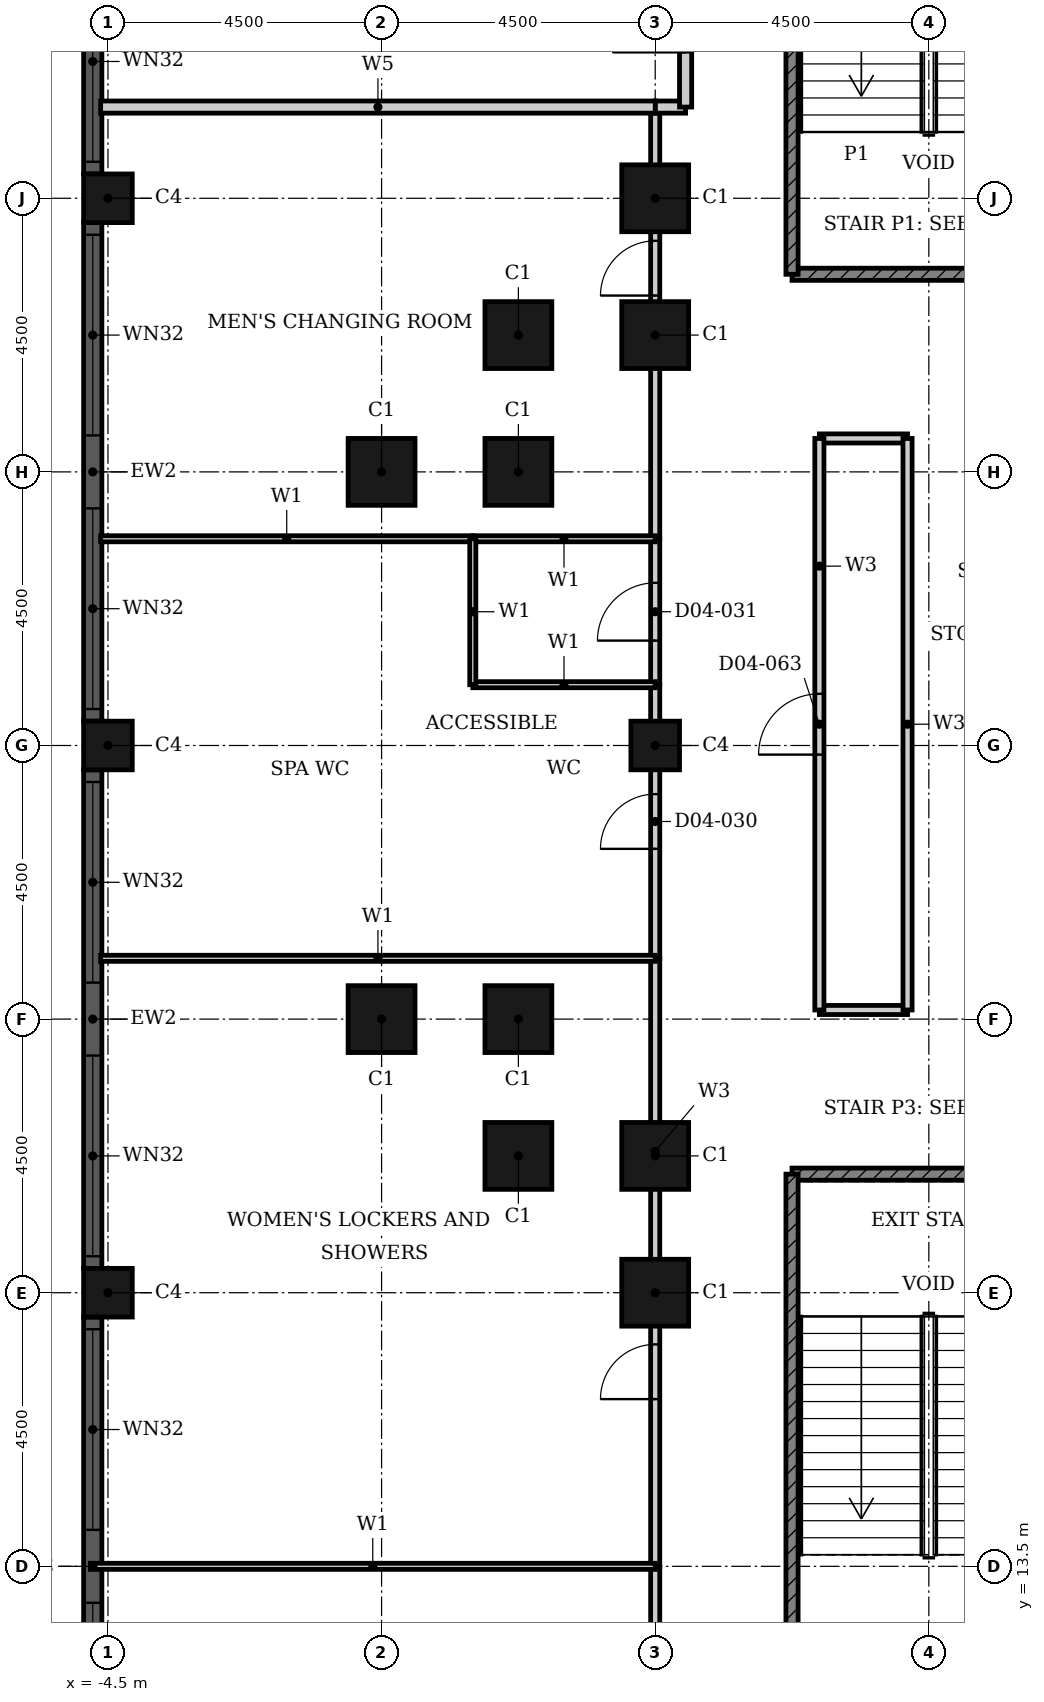
"""IFC4 building model, lengths in metres.
Left out: names, types, materials, properties, quantities, classifications, styles, units other than length and angle.
Written with IfcOpenShell. Run it as: python <this file> out.ifc"""

import sys

from ifc_helpers import new_model, si_unit, direction, frame, frame_2d, origin, origin_2d, place, context, subcontext, project, spatial, rectangle, hollow_rectangle, extrude, element, fill, save


model = new_model("IFC4")
c1 = context("Model", 3, precision=1e-05, world=origin(), true_north=direction((0.0, 1.0)))
c2 = subcontext(c1, "Body", "Model", "MODEL_VIEW")
j1 = project(units=[si_unit("LENGTHUNIT", "METRE"), si_unit("PLANEANGLEUNIT", "RADIAN")], contexts=[c1])
p1 = place(None, origin())
s1 = spatial("IfcSite", under=j1, at=p1, CompositionType="ELEMENT")
p2 = place(p1, origin())
s2 = spatial("IfcBuilding", under=s1, at=p2, CompositionType="ELEMENT")
p3 = place(p2, frame((0.0, 0.0, 24.0)))
s3 = spatial("IfcBuildingStorey", under=s2, at=p3, CompositionType="ELEMENT", Elevation=24.0)
for number, where, z_axis, x_axis in (
    (1, (4.5, 36.0, 0.0), (0.0, 0.0, 1.0), (1.0, 0.0, 0.0)),
    (2, (4.5, 33.75, 0.0), (0.0, 0.0, 1.0), (1.0, 0.0, 0.0)),
    (3, (2.25, 33.75, 0.0), (0.0, 0.0, 1.0), (1.0, 0.0, 0.0)),
    (4, (2.25, 31.5, 0.0), (0.0, 0.0, 1.0), (1.0, 0.0, 0.0)),
    (5, (0.0, 31.5, 0.0), (0.0, 0.0, 1.0), (1.0, 0.0, 0.0)),
    (6, (0.0, 22.5, 0.0), (0.0, 0.0, 1.0), (1.0, 0.0, 0.0)),
    (7, (2.25, 22.5, 0.0), (0.0, 0.0, 1.0), (1.0, 0.0, 0.0)),
    (8, (2.25, 20.25, 0.0), (0.0, 0.0, 1.0), (1.0, 0.0, 0.0)),
    (9, (4.5, 20.25, 0.0), (0.0, 0.0, 1.0), (1.0, 0.0, 0.0)),
    (10, (4.5, 18.0, 0.0), (0.0, 0.0, 1.0), (1.0, 0.0, 0.0)),
):
    element("IfcColumn", number, at=place(p3, frame(where, z_axis=z_axis, x_axis=x_axis)), inside=s3, PredefinedType="COLUMN", context=c2, shape_type="SweptSolid", body=[
        extrude(hollow_rectangle(XDim=1.1, YDim=1.1, WallThickness=0.036, at=origin_2d()), origin(), (0.0, 0.0, 1.0), 4.8),
    ])
for number, where, z_axis, x_axis in (
    (11, (-4.5, 18.0, 0.0), (0.0, 0.0, 1.0), (1.0, 0.0, 0.0)),
    (12, (-4.5, 27.0, 0.0), (0.0, 0.0, 1.0), (1.0, 0.0, 0.0)),
    (13, (-4.5, 36.0, 0.0), (0.0, 0.0, 1.0), (1.0, 0.0, 0.0)),
    (14, (4.5, 27.0, 0.0), (0.0, 0.0, 1.0), (1.0, 0.0, 0.0)),
):
    element("IfcColumn", number, at=place(p3, frame(where, z_axis=z_axis, x_axis=x_axis)), inside=s3, PredefinedType="COLUMN", context=c2, shape_type="SweptSolid", body=[
        extrude(hollow_rectangle(XDim=0.8, YDim=0.8, WallThickness=0.025, at=origin_2d()), origin(), (0.0, 0.0, 1.0), 4.8),
    ])
p4 = place(p3, frame((-4.75, 44.6, 0.0), z_axis=(0.0, 0.0, 1.0), x_axis=(0.0, -1.0, 0.0)))
e15 = element("IfcWall", 15, at=p4, inside=s3, PredefinedType="SOLIDWALL", context=c2, shape_type="SweptSolid", body=[
    extrude(rectangle(XDim=8.2, YDim=0.3, at=frame_2d((4.1, 0.0))), origin(), (0.0, 0.0, 1.0), 4.8),
])
p5 = place(p4, frame((0.2, 0.0, 0.9)))
e16 = element("IfcOpeningElement", 16, at=p5, cuts=e15, PredefinedType="OPENING", context=c2, shape_type="SweptSolid", body=[
    extrude(rectangle(XDim=3.3, YDim=2.9, at=frame_2d((1.65, 1.45))), frame((0.0, 0.16, 0.0), z_axis=(0.0, -1.0, 0.0), x_axis=(1.0, 0.0, 0.0)), (0.0, 0.0, 1.0), 0.32),
])
p6 = place(p4, frame((4.7, 0.0, 0.9)))
e17 = element("IfcOpeningElement", 17, at=p6, cuts=e15, PredefinedType="OPENING", context=c2, shape_type="SweptSolid", body=[
    extrude(rectangle(XDim=3.3, YDim=2.9, at=frame_2d((1.65, 1.45))), frame((0.0, 0.16, 0.0), z_axis=(0.0, -1.0, 0.0), x_axis=(1.0, 0.0, 0.0)), (0.0, 0.0, 1.0), 0.32),
])
p7 = place(p3, frame((-4.75, 35.6, 0.0), z_axis=(0.0, 0.0, 1.0), x_axis=(0.0, -1.0, 0.0)))
e18 = element("IfcWall", 18, at=p7, inside=s3, PredefinedType="SOLIDWALL", context=c2, shape_type="SweptSolid", body=[
    extrude(rectangle(XDim=8.2, YDim=0.3, at=frame_2d((4.1, 0.0))), origin(), (0.0, 0.0, 1.0), 4.8),
])
p8 = place(p7, frame((0.2, 0.0, 0.9)))
e19 = element("IfcOpeningElement", 19, at=p8, cuts=e18, PredefinedType="OPENING", context=c2, shape_type="SweptSolid", body=[
    extrude(rectangle(XDim=3.3, YDim=2.9, at=frame_2d((1.65, 1.45))), frame((0.0, 0.16, 0.0), z_axis=(0.0, -1.0, 0.0), x_axis=(1.0, 0.0, 0.0)), (0.0, 0.0, 1.0), 0.32),
])
p9 = place(p7, frame((4.7, 0.0, 0.9)))
e20 = element("IfcOpeningElement", 20, at=p9, cuts=e18, PredefinedType="OPENING", context=c2, shape_type="SweptSolid", body=[
    extrude(rectangle(XDim=3.3, YDim=2.9, at=frame_2d((1.65, 1.45))), frame((0.0, 0.16, 0.0), z_axis=(0.0, -1.0, 0.0), x_axis=(1.0, 0.0, 0.0)), (0.0, 0.0, 1.0), 0.32),
])
p10 = place(p3, frame((-4.75, 26.6, 0.0), z_axis=(0.0, 0.0, 1.0), x_axis=(0.0, -1.0, 0.0)))
e21 = element("IfcWall", 21, at=p10, inside=s3, PredefinedType="SOLIDWALL", context=c2, shape_type="SweptSolid", body=[
    extrude(rectangle(XDim=8.2, YDim=0.3, at=frame_2d((4.1, 0.0))), origin(), (0.0, 0.0, 1.0), 4.8),
])
p11 = place(p10, frame((0.2, 0.0, 0.9)))
e22 = element("IfcOpeningElement", 22, at=p11, cuts=e21, PredefinedType="OPENING", context=c2, shape_type="SweptSolid", body=[
    extrude(rectangle(XDim=3.3, YDim=2.9, at=frame_2d((1.65, 1.45))), frame((0.0, 0.16, 0.0), z_axis=(0.0, -1.0, 0.0), x_axis=(1.0, 0.0, 0.0)), (0.0, 0.0, 1.0), 0.32),
])
p12 = place(p10, frame((4.7, 0.0, 0.9)))
e23 = element("IfcOpeningElement", 23, at=p12, cuts=e21, PredefinedType="OPENING", context=c2, shape_type="SweptSolid", body=[
    extrude(rectangle(XDim=3.3, YDim=2.9, at=frame_2d((1.65, 1.45))), frame((0.0, 0.16, 0.0), z_axis=(0.0, -1.0, 0.0), x_axis=(1.0, 0.0, 0.0)), (0.0, 0.0, 1.0), 0.32),
])
p13 = place(p3, frame((-4.75, 17.6, 0.0), z_axis=(0.0, 0.0, 1.0), x_axis=(0.0, -1.0, 0.0)))
e24 = element("IfcWall", 24, at=p13, inside=s3, PredefinedType="SOLIDWALL", context=c2, shape_type="SweptSolid", body=[
    extrude(rectangle(XDim=8.2, YDim=0.3, at=frame_2d((4.1, 0.0))), origin(), (0.0, 0.0, 1.0), 4.8),
])
p14 = place(p13, frame((0.2, 0.0, 0.9)))
e25 = element("IfcOpeningElement", 25, at=p14, cuts=e24, PredefinedType="OPENING", context=c2, shape_type="SweptSolid", body=[
    extrude(rectangle(XDim=3.3, YDim=2.9, at=frame_2d((1.65, 1.45))), frame((0.0, 0.16, 0.0), z_axis=(0.0, -1.0, 0.0), x_axis=(1.0, 0.0, 0.0)), (0.0, 0.0, 1.0), 0.32),
])
p15 = place(p13, frame((4.7, 0.0, 0.9)))
e26 = element("IfcOpeningElement", 26, at=p15, cuts=e24, PredefinedType="OPENING", context=c2, shape_type="SweptSolid", body=[
    extrude(rectangle(XDim=3.3, YDim=2.9, at=frame_2d((1.65, 1.45))), frame((0.0, 0.16, 0.0), z_axis=(0.0, -1.0, 0.0), x_axis=(1.0, 0.0, 0.0)), (0.0, 0.0, 1.0), 0.32),
])
for number, where, z_axis, x_axis in (
    (27, (7.2, 22.65, 0.0), (0.0, 0.0, 1.0), (1.0, 0.0, 0.0)),
    (28, (7.2, 32.05, 0.0), (0.0, 0.0, 1.0), (1.0, 0.0, 0.0)),
):
    element("IfcWall", number, at=place(p3, frame(where, z_axis=z_axis, x_axis=x_axis)), inside=s3, PredefinedType="PARTITIONING", context=c2, shape_type="SweptSolid", body=[
        extrude(rectangle(XDim=1.45, YDim=0.15, at=frame_2d((0.725, 0.0))), origin(), (0.0, 0.0, 1.0), 4.45),
    ])
p16 = place(p3, frame((4.5, 9.0, 0.0), z_axis=(0.0, 0.0, 1.0), x_axis=(0.0, 1.0, 0.0)))
e29 = element("IfcWall", 29, at=p16, inside=s3, PredefinedType="PARTITIONING", context=c2, shape_type="SweptSolid", body=[
    extrude(rectangle(XDim=4.5, YDim=0.15, at=frame_2d((2.25, 0.0))), origin(), (0.0, 0.0, 1.0), 4.45),
])
p17 = place(p16, frame((1.8, 0.0, 0.0)))
e30 = element("IfcOpeningElement", 30, at=p17, cuts=e29, PredefinedType="OPENING", context=c2, shape_type="SweptSolid", body=[
    extrude(rectangle(XDim=0.9, YDim=2.1, at=frame_2d((0.45, 1.05))), frame((0.0, 0.085, 0.0), z_axis=(0.0, -1.0, 0.0), x_axis=(1.0, 0.0, 0.0)), (0.0, 0.0, 1.0), 0.17),
])
p18 = place(p3, frame((4.5, 13.5, 0.0), z_axis=(0.0, 0.0, 1.0), x_axis=(0.0, 1.0, 0.0)))
e31 = element("IfcWall", 31, at=p18, inside=s3, PredefinedType="PARTITIONING", context=c2, shape_type="SweptSolid", body=[
    extrude(rectangle(XDim=10.0, YDim=0.15, at=frame_2d((5.0, 0.0))), origin(), (0.0, 0.0, 1.0), 4.45),
])
p19 = place(p18, frame((2.75, 0.0, 0.0)))
e32 = element("IfcOpeningElement", 32, at=p19, cuts=e31, PredefinedType="OPENING", context=c2, shape_type="SweptSolid", body=[
    extrude(rectangle(XDim=0.9, YDim=2.1, at=frame_2d((0.45, 1.05))), frame((0.0, 0.085, 0.0), z_axis=(0.0, -1.0, 0.0), x_axis=(1.0, 0.0, 0.0)), (0.0, 0.0, 1.0), 0.17),
])
p20 = place(p3, frame((4.5, 23.5, 0.0), z_axis=(0.0, 0.0, 1.0), x_axis=(0.0, 1.0, 0.0)))
e33 = element("IfcWall", 33, at=p20, inside=s3, PredefinedType="PARTITIONING", context=c2, shape_type="SweptSolid", body=[
    extrude(rectangle(XDim=4.5, YDim=0.15, at=frame_2d((2.25, 0.0))), origin(), (0.0, 0.0, 1.0), 4.45),
])
p21 = place(p20, frame((1.8, 0.0, 0.0)))
e34 = element("IfcOpeningElement", 34, at=p21, cuts=e33, PredefinedType="OPENING", context=c2, shape_type="SweptSolid", body=[
    extrude(rectangle(XDim=0.9, YDim=2.1, at=frame_2d((0.45, 1.05))), frame((0.0, 0.085, 0.0), z_axis=(0.0, -1.0, 0.0), x_axis=(1.0, 0.0, 0.0)), (0.0, 0.0, 1.0), 0.17),
])
p22 = place(p3, frame((4.5, 28.0, 0.0), z_axis=(0.0, 0.0, 1.0), x_axis=(0.0, 1.0, 0.0)))
e35 = element("IfcWall", 35, at=p22, inside=s3, PredefinedType="PARTITIONING", context=c2, shape_type="SweptSolid", body=[
    extrude(rectangle(XDim=2.4, YDim=0.15, at=frame_2d((1.2, 0.0))), origin(), (0.0, 0.0, 1.0), 4.45),
])
p23 = place(p22, frame((0.725, 0.0, 0.0)))
e36 = element("IfcOpeningElement", 36, at=p23, cuts=e35, PredefinedType="OPENING", context=c2, shape_type="SweptSolid", body=[
    extrude(rectangle(XDim=0.95, YDim=2.1, at=frame_2d((0.475, 1.05))), frame((0.0, 0.085, 0.0), z_axis=(0.0, -1.0, 0.0), x_axis=(1.0, 0.0, 0.0)), (0.0, 0.0, 1.0), 0.17),
])
p24 = place(p3, frame((4.5, 30.4, 0.0), z_axis=(0.0, 0.0, 1.0), x_axis=(0.0, 1.0, 0.0)))
e37 = element("IfcWall", 37, at=p24, inside=s3, PredefinedType="PARTITIONING", context=c2, shape_type="SweptSolid", body=[
    extrude(rectangle(XDim=7.1, YDim=0.15, at=frame_2d((3.55, 0.0))), origin(), (0.0, 0.0, 1.0), 4.45),
])
p25 = place(p24, frame((4.0, 0.0, 0.0)))
e38 = element("IfcOpeningElement", 38, at=p25, cuts=e37, PredefinedType="OPENING", context=c2, shape_type="SweptSolid", body=[
    extrude(rectangle(XDim=0.9, YDim=2.1, at=frame_2d((0.45, 1.05))), frame((0.0, 0.085, 0.0), z_axis=(0.0, -1.0, 0.0), x_axis=(1.0, 0.0, 0.0)), (0.0, 0.0, 1.0), 0.17),
])
p26 = place(p3, frame((7.2, 22.65, 0.0), z_axis=(0.0, 0.0, 1.0), x_axis=(0.0, 1.0, 0.0)))
e39 = element("IfcWall", 39, at=p26, inside=s3, PredefinedType="PARTITIONING", context=c2, shape_type="SweptSolid", body=[
    extrude(rectangle(XDim=9.4, YDim=0.15, at=frame_2d((4.7, 0.0))), origin(), (0.0, 0.0, 1.0), 4.45),
])
p27 = place(p26, frame((4.2, 0.0, 0.0)))
e40 = element("IfcOpeningElement", 40, at=p27, cuts=e39, PredefinedType="OPENING", context=c2, shape_type="SweptSolid", body=[
    extrude(rectangle(XDim=1.0, YDim=2.1, at=frame_2d((0.5, 1.05))), frame((0.0, 0.085, 0.0), z_axis=(0.0, -1.0, 0.0), x_axis=(1.0, 0.0, 0.0)), (0.0, 0.0, 1.0), 0.17),
])
p28 = place(p3, frame((8.65, 22.65, 0.0), z_axis=(0.0, 0.0, 1.0), x_axis=(0.0, 1.0, 0.0)))
e41 = element("IfcWall", 41, at=p28, inside=s3, PredefinedType="PARTITIONING", context=c2, shape_type="SweptSolid", body=[
    extrude(rectangle(XDim=9.4, YDim=0.15, at=frame_2d((4.7, 0.0))), origin(), (0.0, 0.0, 1.0), 4.45),
])
p29 = place(p3, frame((-4.79, 13.5, 0.0), z_axis=(0.0, 0.0, 1.0), x_axis=(1.0, 0.0, 0.0)))
e42 = element("IfcWall", 42, at=p29, inside=s3, PredefinedType="PARTITIONING", context=c2, shape_type="SweptSolid", body=[
    extrude(rectangle(XDim=9.29, YDim=0.1, at=frame_2d((4.645, 0.0))), origin(), (0.0, 0.0, 1.0), 4.45),
])
p30 = place(p3, frame((-4.62, 23.5, 0.0), z_axis=(0.0, 0.0, 1.0), x_axis=(1.0, 0.0, 0.0)))
e43 = element("IfcWall", 43, at=p30, inside=s3, PredefinedType="PARTITIONING", context=c2, shape_type="SweptSolid", body=[
    extrude(rectangle(XDim=9.12, YDim=0.1, at=frame_2d((4.56, 0.0))), origin(), (0.0, 0.0, 1.0), 4.45),
])
p31 = place(p3, frame((1.5, 28.0, 0.0), z_axis=(0.0, 0.0, 1.0), x_axis=(1.0, 0.0, 0.0)))
e44 = element("IfcWall", 44, at=p31, inside=s3, PredefinedType="PARTITIONING", context=c2, shape_type="SweptSolid", body=[
    extrude(rectangle(XDim=3.0, YDim=0.1, at=frame_2d((1.5, 0.0))), origin(), (0.0, 0.0, 1.0), 4.45),
])
p32 = place(p3, frame((-4.62, 30.4, 0.0), z_axis=(0.0, 0.0, 1.0), x_axis=(1.0, 0.0, 0.0)))
e45 = element("IfcWall", 45, at=p32, inside=s3, PredefinedType="PARTITIONING", context=c2, shape_type="SweptSolid", body=[
    extrude(rectangle(XDim=6.12, YDim=0.1, at=frame_2d((3.06, 0.0))), origin(), (0.0, 0.0, 1.0), 4.45),
])
p33 = place(p3, frame((1.5, 30.4, 0.0), z_axis=(0.0, 0.0, 1.0), x_axis=(1.0, 0.0, 0.0)))
e46 = element("IfcWall", 46, at=p33, inside=s3, PredefinedType="PARTITIONING", context=c2, shape_type="SweptSolid", body=[
    extrude(rectangle(XDim=3.0, YDim=0.1, at=frame_2d((1.5, 0.0))), origin(), (0.0, 0.0, 1.0), 4.45),
])
p34 = place(p3, frame((1.5, 28.0, 0.0), z_axis=(0.0, 0.0, 1.0), x_axis=(0.0, 1.0, 0.0)))
e47 = element("IfcWall", 47, at=p34, inside=s3, PredefinedType="PARTITIONING", context=c2, shape_type="SweptSolid", body=[
    extrude(rectangle(XDim=2.4, YDim=0.1, at=frame_2d((1.2, 0.0))), origin(), (0.0, 0.0, 1.0), 4.45),
])
p35 = place(p3, frame((4.5, 37.5, 0.0), z_axis=(0.0, 0.0, 1.0), x_axis=(1.0, 0.0, 0.0)))
e48 = element("IfcWall", 48, at=p35, inside=s3, PredefinedType="PARTITIONING", context=c2, shape_type="SweptSolid", body=[
    extrude(rectangle(XDim=0.5, YDim=0.2, at=frame_2d((0.25, 0.0))), origin(), (0.0, 0.0, 1.0), 4.45),
])
p36 = place(p3, frame((-4.62, 37.5, 0.0), z_axis=(0.0, 0.0, 1.0), x_axis=(1.0, 0.0, 0.0)))
e49 = element("IfcWall", 49, at=p36, inside=s3, PredefinedType="PARTITIONING", context=c2, shape_type="SweptSolid", body=[
    extrude(rectangle(XDim=9.12, YDim=0.2, at=frame_2d((4.56, 0.0))), origin(), (0.0, 0.0, 1.0), 4.45),
])
p37 = place(p3, frame((5.0, 37.5, 0.0), z_axis=(0.0, 0.0, 1.0), x_axis=(0.0, 1.0, 0.0)))
e50 = element("IfcWall", 50, at=p37, inside=s3, PredefinedType="PARTITIONING", context=c2, shape_type="SweptSolid", body=[
    extrude(rectangle(XDim=3.0, YDim=0.2, at=frame_2d((1.5, 0.0))), origin(), (0.0, 0.0, 1.0), 4.45),
])
p38 = place(p37, frame((0.9, 0.0, 0.0)))
e51 = element("IfcOpeningElement", 51, at=p38, cuts=e50, PredefinedType="OPENING", context=c2, shape_type="SweptSolid", body=[
    extrude(rectangle(XDim=1.2, YDim=2.1, at=frame_2d((0.6, 1.05))), frame((0.0, 0.11, 0.0), z_axis=(0.0, -1.0, 0.0), x_axis=(1.0, 0.0, 0.0)), (0.0, 0.0, 1.0), 0.22),
])
for number, where, z_axis, x_axis in (
    (52, (6.75, 19.95, 0.0), (0.0, 0.0, 1.0), (1.0, 0.0, 0.0)),
    (53, (6.75, 34.75, 0.0), (0.0, 0.0, 1.0), (1.0, 0.0, 0.0)),
):
    element("IfcWall", number, at=place(p3, frame(where, z_axis=z_axis, x_axis=x_axis)), inside=s3, PredefinedType="SHEAR", context=c2, shape_type="SweptSolid", body=[
        extrude(rectangle(XDim=4.5, YDim=0.2, at=frame_2d((2.25, 0.0))), origin(), (0.0, 0.0, 1.0), 4.45),
    ])
for number, where, z_axis, x_axis in (
    (54, (6.75, 34.75, 0.0), (0.0, 0.0, 1.0), (0.0, 1.0, 0.0)),
    (55, (6.75, 11.5, 0.0), (0.0, 0.0, 1.0), (0.0, 1.0, 0.0)),
):
    element("IfcWall", number, at=place(p3, frame(where, z_axis=z_axis, x_axis=x_axis)), inside=s3, PredefinedType="SHEAR", context=c2, shape_type="SweptSolid", body=[
        extrude(rectangle(XDim=8.45, YDim=0.2, at=frame_2d((4.225, 0.0))), origin(), (0.0, 0.0, 1.0), 4.45),
    ])
p39 = place(p6, origin())
e56 = element("IfcWindow", 56, at=p39, inside=s3, PartitioningType="SINGLE_PANEL", PredefinedType="WINDOW", context=c2, shape_type="SweptSolid", body=[
    extrude(rectangle(XDim=3.3, YDim=2.9, at=frame_2d((1.65, 1.45))), frame((0.0, 0.03, 0.0), z_axis=(0.0, -1.0, 0.0), x_axis=(1.0, 0.0, 0.0)), (0.0, 0.0, 1.0), 0.06),
])
fill(e17, e56)
p40 = place(p8, origin())
e57 = element("IfcWindow", 57, at=p40, inside=s3, PartitioningType="SINGLE_PANEL", PredefinedType="WINDOW", context=c2, shape_type="SweptSolid", body=[
    extrude(rectangle(XDim=3.3, YDim=2.9, at=frame_2d((1.65, 1.45))), frame((0.0, 0.03, 0.0), z_axis=(0.0, -1.0, 0.0), x_axis=(1.0, 0.0, 0.0)), (0.0, 0.0, 1.0), 0.06),
])
fill(e19, e57)
p41 = place(p9, origin())
e58 = element("IfcWindow", 58, at=p41, inside=s3, PartitioningType="SINGLE_PANEL", PredefinedType="WINDOW", context=c2, shape_type="SweptSolid", body=[
    extrude(rectangle(XDim=3.3, YDim=2.9, at=frame_2d((1.65, 1.45))), frame((0.0, 0.03, 0.0), z_axis=(0.0, -1.0, 0.0), x_axis=(1.0, 0.0, 0.0)), (0.0, 0.0, 1.0), 0.06),
])
fill(e20, e58)
p42 = place(p11, origin())
e59 = element("IfcWindow", 59, at=p42, inside=s3, PartitioningType="SINGLE_PANEL", PredefinedType="WINDOW", context=c2, shape_type="SweptSolid", body=[
    extrude(rectangle(XDim=3.3, YDim=2.9, at=frame_2d((1.65, 1.45))), frame((0.0, 0.03, 0.0), z_axis=(0.0, -1.0, 0.0), x_axis=(1.0, 0.0, 0.0)), (0.0, 0.0, 1.0), 0.06),
])
fill(e22, e59)
p43 = place(p12, origin())
e60 = element("IfcWindow", 60, at=p43, inside=s3, PartitioningType="SINGLE_PANEL", PredefinedType="WINDOW", context=c2, shape_type="SweptSolid", body=[
    extrude(rectangle(XDim=3.3, YDim=2.9, at=frame_2d((1.65, 1.45))), frame((0.0, 0.03, 0.0), z_axis=(0.0, -1.0, 0.0), x_axis=(1.0, 0.0, 0.0)), (0.0, 0.0, 1.0), 0.06),
])
fill(e23, e60)
p44 = place(p14, origin())
e61 = element("IfcWindow", 61, at=p44, inside=s3, PartitioningType="SINGLE_PANEL", PredefinedType="WINDOW", context=c2, shape_type="SweptSolid", body=[
    extrude(rectangle(XDim=3.3, YDim=2.9, at=frame_2d((1.65, 1.45))), frame((0.0, 0.03, 0.0), z_axis=(0.0, -1.0, 0.0), x_axis=(1.0, 0.0, 0.0)), (0.0, 0.0, 1.0), 0.06),
])
fill(e25, e61)
p45 = place(p15, origin())
e62 = element("IfcWindow", 62, at=p45, inside=s3, PartitioningType="SINGLE_PANEL", PredefinedType="WINDOW", context=c2, shape_type="SweptSolid", body=[
    extrude(rectangle(XDim=3.3, YDim=2.9, at=frame_2d((1.65, 1.45))), frame((0.0, 0.03, 0.0), z_axis=(0.0, -1.0, 0.0), x_axis=(1.0, 0.0, 0.0)), (0.0, 0.0, 1.0), 0.06),
])
fill(e26, e62)
p46 = place(p19, origin())
e63 = element("IfcDoor", 63, at=p46, inside=s3, OperationType="SINGLE_SWING_LEFT", PredefinedType="DOOR", context=c2, shape_type="SweptSolid", body=[
    extrude(rectangle(XDim=0.9, YDim=2.1, at=frame_2d((0.45, 1.05))), frame((0.0, 0.025, 0.0), z_axis=(0.0, -1.0, 0.0), x_axis=(1.0, 0.0, 0.0)), (0.0, 0.0, 1.0), 0.05),
])
fill(e32, e63)
p47 = place(p21, origin())
e64 = element("IfcDoor", 64, at=p47, inside=s3, OperationType="SINGLE_SWING_RIGHT", PredefinedType="DOOR", context=c2, shape_type="SweptSolid", body=[
    extrude(rectangle(XDim=0.9, YDim=2.1, at=frame_2d((0.45, 1.05))), frame((0.0, 0.025, 0.0), z_axis=(0.0, -1.0, 0.0), x_axis=(1.0, 0.0, 0.0)), (0.0, 0.0, 1.0), 0.05),
])
fill(e34, e64)
p48 = place(p23, origin())
e65 = element("IfcDoor", 65, at=p48, inside=s3, OperationType="SINGLE_SWING_LEFT", PredefinedType="DOOR", context=c2, shape_type="SweptSolid", body=[
    extrude(rectangle(XDim=0.95, YDim=2.1, at=frame_2d((0.475, 1.05))), frame((0.0, 0.025, 0.0), z_axis=(0.0, -1.0, 0.0), x_axis=(1.0, 0.0, 0.0)), (0.0, 0.0, 1.0), 0.05),
])
fill(e36, e65)
p49 = place(p25, origin())
e66 = element("IfcDoor", 66, at=p49, inside=s3, OperationType="SINGLE_SWING_RIGHT", PredefinedType="DOOR", context=c2, shape_type="SweptSolid", body=[
    extrude(rectangle(XDim=0.9, YDim=2.1, at=frame_2d((0.45, 1.05))), frame((0.0, 0.025, 0.0), z_axis=(0.0, -1.0, 0.0), x_axis=(1.0, 0.0, 0.0)), (0.0, 0.0, 1.0), 0.05),
])
fill(e38, e66)
p50 = place(p27, origin())
e67 = element("IfcDoor", 67, at=p50, inside=s3, OperationType="SINGLE_SWING_RIGHT", PredefinedType="DOOR", context=c2, shape_type="SweptSolid", body=[
    extrude(rectangle(XDim=1.0, YDim=2.1, at=frame_2d((0.5, 1.05))), frame((0.0, 0.025, 0.0), z_axis=(0.0, -1.0, 0.0), x_axis=(1.0, 0.0, 0.0)), (0.0, 0.0, 1.0), 0.05),
])
fill(e40, e67)
save(model, sys.argv[1])
